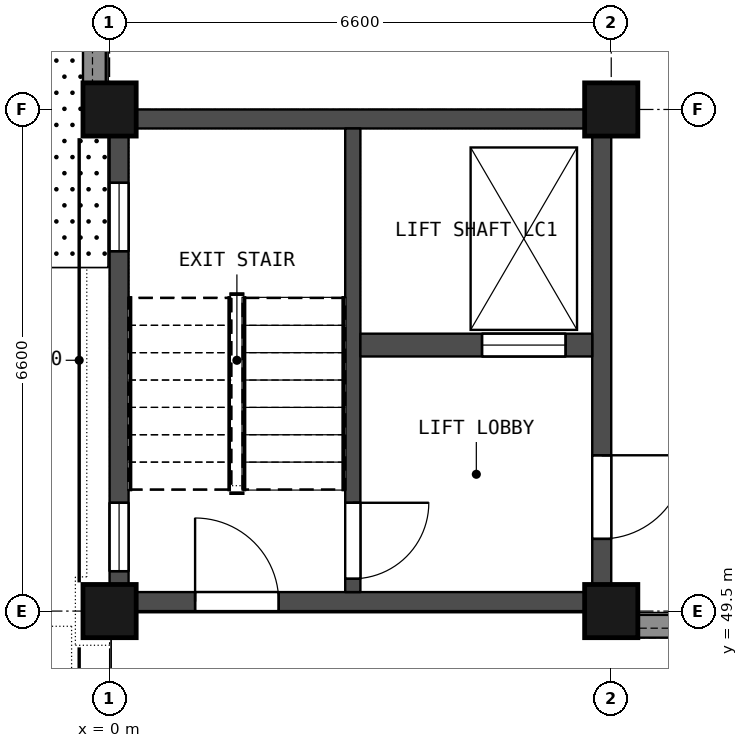
"""IFC4 building model, lengths in metres.
Left out: names, types, materials, properties, quantities, classifications, styles, units other than length and angle.
Written with IfcOpenShell. Run it as: python <this file> out.ifc"""

import sys

from ifc_helpers import new_model, si_unit, direction, frame, frame_2d, origin, origin_2d, place, context, subcontext, project, spatial, rectangle, extrude, element, fill, save


model = new_model("IFC4")
c1 = context("Model", 3, precision=1e-05, world=origin(), true_north=direction((0.0, 1.0)))
c2 = subcontext(c1, "Body", "Model", "MODEL_VIEW")
j1 = project(units=[si_unit("LENGTHUNIT", "METRE"), si_unit("PLANEANGLEUNIT", "RADIAN")], contexts=[c1])
p1 = place(None, origin())
s1 = spatial("IfcSite", under=j1, at=p1, CompositionType="ELEMENT")
p2 = place(p1, origin())
s2 = spatial("IfcBuilding", under=s1, at=p2, CompositionType="ELEMENT")
p3 = place(p2, origin())
s3 = spatial("IfcBuildingStorey", under=s2, at=p3, CompositionType="ELEMENT", Elevation=0.0)
for number, where, z_axis, x_axis in (
    (1, (0.0, 49.5, 0.0), (0.0, 0.0, 1.0), (1.0, 0.0, 0.0)),
    (2, (0.0, 56.1, 0.0), (0.0, 0.0, 1.0), (1.0, 0.0, 0.0)),
    (3, (6.6, 49.5, 0.0), (0.0, 0.0, 1.0), (1.0, 0.0, 0.0)),
    (4, (6.6, 56.1, 0.0), (0.0, 0.0, 1.0), (1.0, 0.0, 0.0)),
):
    element("IfcColumn", number, at=place(p3, frame(where, z_axis=z_axis, x_axis=x_axis)), inside=s3, PredefinedType="COLUMN", context=c2, shape_type="SweptSolid", body=[
        extrude(rectangle(XDim=0.7, YDim=0.7, at=origin_2d()), origin(), (0.0, 0.0, 1.0), 5.4),
    ])
p4 = place(p3, frame((6.475, 49.5, 0.0), z_axis=(0.0, 0.0, 1.0), x_axis=(0.0, 1.0, 0.0)))
e5 = element("IfcWall", 5, at=p4, inside=s3, PredefinedType="SHEAR", context=c2, shape_type="SweptSolid", body=[
    extrude(rectangle(XDim=6.6, YDim=0.25, at=frame_2d((3.3, 0.0))), origin(), (0.0, 0.0, 1.0), 5.05),
])
p5 = place(p4, frame((0.95, 0.0, 0.0)))
e6 = element("IfcOpeningElement", 6, at=p5, cuts=e5, PredefinedType="OPENING", context=c2, shape_type="SweptSolid", body=[
    extrude(rectangle(XDim=1.1, YDim=2.1, at=frame_2d((0.55, 1.05))), frame((0.0, 0.135, 0.0), z_axis=(0.0, -1.0, 0.0), x_axis=(1.0, 0.0, 0.0)), (0.0, 0.0, 1.0), 0.27),
])
p6 = place(p3, frame((0.125, 49.5, 0.0), z_axis=(0.0, 0.0, 1.0), x_axis=(0.0, 1.0, 0.0)))
e7 = element("IfcWall", 7, at=p6, inside=s3, PredefinedType="SHEAR", context=c2, shape_type="SweptSolid", body=[
    extrude(rectangle(XDim=6.6, YDim=0.25, at=frame_2d((3.3, 0.0))), origin(), (0.0, 0.0, 1.0), 5.05),
])
p7 = place(p6, frame((4.735, 0.0, 2.05)))
e8 = element("IfcOpeningElement", 8, at=p7, cuts=e7, PredefinedType="OPENING", context=c2, shape_type="SweptSolid", body=[
    extrude(rectangle(XDim=0.9, YDim=1.2, at=frame_2d((0.45, 0.6))), frame((0.0, 0.135, 0.0), z_axis=(0.0, -1.0, 0.0), x_axis=(1.0, 0.0, 0.0)), (0.0, 0.0, 1.0), 0.27),
])
p8 = place(p6, frame((0.525, 0.0, 3.4)))
e9 = element("IfcOpeningElement", 9, at=p8, cuts=e7, PredefinedType="OPENING", context=c2, shape_type="SweptSolid", body=[
    extrude(rectangle(XDim=0.9, YDim=1.2, at=frame_2d((0.45, 0.6))), frame((0.0, 0.135, 0.0), z_axis=(0.0, -1.0, 0.0), x_axis=(1.0, 0.0, 0.0)), (0.0, 0.0, 1.0), 0.27),
])
p9 = place(p3, frame((6.35, 49.625, 0.0), z_axis=(0.0, 0.0, 1.0), x_axis=(-1.0, 0.0, 0.0)))
e10 = element("IfcWall", 10, at=p9, inside=s3, PredefinedType="SHEAR", context=c2, shape_type="SweptSolid", body=[
    extrude(rectangle(XDim=6.1, YDim=0.25, at=frame_2d((3.05, 0.0))), origin(), (0.0, 0.0, 1.0), 5.05),
])
p10 = place(p9, frame((4.125, 0.0, 0.0)))
e11 = element("IfcOpeningElement", 11, at=p10, cuts=e10, PredefinedType="OPENING", context=c2, shape_type="SweptSolid", body=[
    extrude(rectangle(XDim=1.1, YDim=2.4, at=frame_2d((0.55, 1.2))), frame((0.0, 0.135, 0.0), z_axis=(0.0, -1.0, 0.0), x_axis=(1.0, 0.0, 0.0)), (0.0, 0.0, 1.0), 0.27),
])
p11 = place(p3, frame((6.35, 55.975, 0.0), z_axis=(0.0, 0.0, 1.0), x_axis=(-1.0, 0.0, 0.0)))
e12 = element("IfcWall", 12, at=p11, inside=s3, PredefinedType="SHEAR", context=c2, shape_type="SweptSolid", body=[
    extrude(rectangle(XDim=6.1, YDim=0.25, at=frame_2d((3.05, 0.0))), origin(), (0.0, 0.0, 1.0), 5.05),
])
p12 = place(p3, frame((3.2, 49.75, 0.0), z_axis=(0.0, 0.0, 1.0), x_axis=(0.0, 1.0, 0.0)))
e13 = element("IfcWall", 13, at=p12, inside=s3, PredefinedType="SHEAR", context=c2, shape_type="SweptSolid", body=[
    extrude(rectangle(XDim=6.1, YDim=0.2, at=frame_2d((3.05, 0.0))), origin(), (0.0, 0.0, 1.0), 5.05),
])
p13 = place(p12, frame((0.175, 0.0, 0.0)))
e14 = element("IfcOpeningElement", 14, at=p13, cuts=e13, PredefinedType="OPENING", context=c2, shape_type="SweptSolid", body=[
    extrude(rectangle(XDim=1.0, YDim=2.1, at=frame_2d((0.5, 1.05))), frame((0.0, 0.11, 0.0), z_axis=(0.0, -1.0, 0.0), x_axis=(1.0, 0.0, 0.0)), (0.0, 0.0, 1.0), 0.22),
])
p14 = place(p3, frame((6.35, 53.0, 0.0), z_axis=(0.0, 0.0, 1.0), x_axis=(-1.0, 0.0, 0.0)))
e15 = element("IfcWall", 15, at=p14, inside=s3, PredefinedType="SHEAR", context=c2, shape_type="SweptSolid", body=[
    extrude(rectangle(XDim=3.05, YDim=0.3, at=frame_2d((1.525, 0.0))), origin(), (0.0, 0.0, 1.0), 5.05),
])
p15 = place(p14, frame((0.35, 0.0, 0.0)))
e16 = element("IfcOpeningElement", 16, at=p15, cuts=e15, PredefinedType="OPENING", context=c2, shape_type="SweptSolid", body=[
    extrude(rectangle(XDim=1.1, YDim=2.2, at=frame_2d((0.55, 1.1))), frame((0.0, 0.16, 0.0), z_axis=(0.0, -1.0, 0.0), x_axis=(1.0, 0.0, 0.0)), (0.0, 0.0, 1.0), 0.32),
])
p16 = place(p3, frame((12.85, 49.3, 0.0), z_axis=(0.0, 0.0, 1.0), x_axis=(-1.0, 0.0, 0.0)))
e17 = element("IfcWall", 17, at=p16, inside=s3, PredefinedType="STANDARD", context=c2, shape_type="SweptSolid", body=[
    extrude(rectangle(XDim=5.9, YDim=0.3, at=frame_2d((2.95, 0.0))), origin(), (0.0, 0.0, 1.0), 4.15),
])
p17 = place(p16, frame((4.0, 0.0, 1.1)))
e18 = element("IfcOpeningElement", 18, at=p17, cuts=e17, PredefinedType="OPENING", context=c2, shape_type="SweptSolid", body=[
    extrude(rectangle(XDim=1.2, YDim=1.2, at=frame_2d((0.6, 0.6))), frame((0.0, 0.16, 0.0), z_axis=(0.0, -1.0, 0.0), x_axis=(1.0, 0.0, 0.0)), (0.0, 0.0, 1.0), 0.32),
])
p18 = place(p16, frame((0.7, 0.0, 2.4)))
e19 = element("IfcOpeningElement", 19, at=p18, cuts=e17, PredefinedType="OPENING", context=c2, shape_type="SweptSolid", body=[
    extrude(rectangle(XDim=1.2, YDim=0.6, at=frame_2d((0.6, 0.3))), frame((0.0, 0.16, 0.0), z_axis=(0.0, -1.0, 0.0), x_axis=(1.0, 0.0, 0.0)), (0.0, 0.0, 1.0), 0.32),
])
p19 = place(p3, frame((-0.2, 56.45, 0.0), z_axis=(0.0, 0.0, 1.0), x_axis=(0.0, 1.0, 0.0)))
e20 = element("IfcWall", 20, at=p19, inside=s3, PredefinedType="STANDARD", context=c2, shape_type="SweptSolid", body=[
    extrude(rectangle(XDim=5.9, YDim=0.3, at=frame_2d((2.95, 0.0))), origin(), (0.0, 0.0, 1.0), 4.15),
])
p20 = place(p19, frame((0.7, 0.0, 1.1)))
e21 = element("IfcOpeningElement", 21, at=p20, cuts=e20, PredefinedType="OPENING", context=c2, shape_type="SweptSolid", body=[
    extrude(rectangle(XDim=1.2, YDim=1.2, at=frame_2d((0.6, 0.6))), frame((0.0, 0.16, 0.0), z_axis=(0.0, -1.0, 0.0), x_axis=(1.0, 0.0, 0.0)), (0.0, 0.0, 1.0), 0.32),
])
p21 = place(p5, origin())
e22 = element("IfcDoor", 22, at=p21, inside=s3, OperationType="SINGLE_SWING_RIGHT", PredefinedType="DOOR", context=c2, shape_type="SweptSolid", body=[
    extrude(rectangle(XDim=1.1, YDim=2.1, at=frame_2d((0.55, 1.05))), frame((0.0, 0.025, 0.0), z_axis=(0.0, -1.0, 0.0), x_axis=(1.0, 0.0, 0.0)), (0.0, 0.0, 1.0), 0.05),
])
fill(e6, e22)
p22 = place(p13, origin())
e23 = element("IfcDoor", 23, at=p22, inside=s3, OperationType="SINGLE_SWING_RIGHT", PredefinedType="DOOR", context=c2, shape_type="SweptSolid", body=[
    extrude(rectangle(XDim=1.0, YDim=2.1, at=frame_2d((0.5, 1.05))), frame((0.0, 0.025, 0.0), z_axis=(0.0, -1.0, 0.0), x_axis=(1.0, 0.0, 0.0)), (0.0, 0.0, 1.0), 0.05),
])
fill(e14, e23)
p23 = place(p10, origin())
e24 = element("IfcDoor", 24, at=p23, inside=s3, OperationType="SINGLE_SWING_RIGHT", PredefinedType="DOOR", context=c2, shape_type="SweptSolid", body=[
    extrude(rectangle(XDim=1.1, YDim=2.4, at=frame_2d((0.55, 1.2))), frame((0.0, 0.025, 0.0), z_axis=(0.0, -1.0, 0.0), x_axis=(1.0, 0.0, 0.0)), (0.0, 0.0, 1.0), 0.05),
])
fill(e11, e24)
p24 = place(p15, origin())
e25 = element("IfcDoor", 25, at=p24, inside=s3, OperationType="DOUBLE_DOOR_SLIDING", PredefinedType="NOTDEFINED", context=c2, shape_type="SweptSolid", body=[
    extrude(rectangle(XDim=1.1, YDim=2.2, at=frame_2d((0.55, 1.1))), frame((0.0, 0.025, 0.0), z_axis=(0.0, -1.0, 0.0), x_axis=(1.0, 0.0, 0.0)), (0.0, 0.0, 1.0), 0.05),
])
fill(e16, e25)
p25 = place(p7, origin())
e26 = element("IfcWindow", 26, at=p25, inside=s3, PartitioningType="SINGLE_PANEL", PredefinedType="WINDOW", context=c2, shape_type="SweptSolid", body=[
    extrude(rectangle(XDim=0.9, YDim=1.2, at=frame_2d((0.45, 0.6))), frame((0.0, 0.03, 0.0), z_axis=(0.0, -1.0, 0.0), x_axis=(1.0, 0.0, 0.0)), (0.0, 0.0, 1.0), 0.06),
])
fill(e8, e26)
p26 = place(p8, origin())
e27 = element("IfcWindow", 27, at=p26, inside=s3, PartitioningType="SINGLE_PANEL", PredefinedType="WINDOW", context=c2, shape_type="SweptSolid", body=[
    extrude(rectangle(XDim=0.9, YDim=1.2, at=frame_2d((0.45, 0.6))), frame((0.0, 0.03, 0.0), z_axis=(0.0, -1.0, 0.0), x_axis=(1.0, 0.0, 0.0)), (0.0, 0.0, 1.0), 0.06),
])
fill(e9, e27)
save(model, sys.argv[1])
